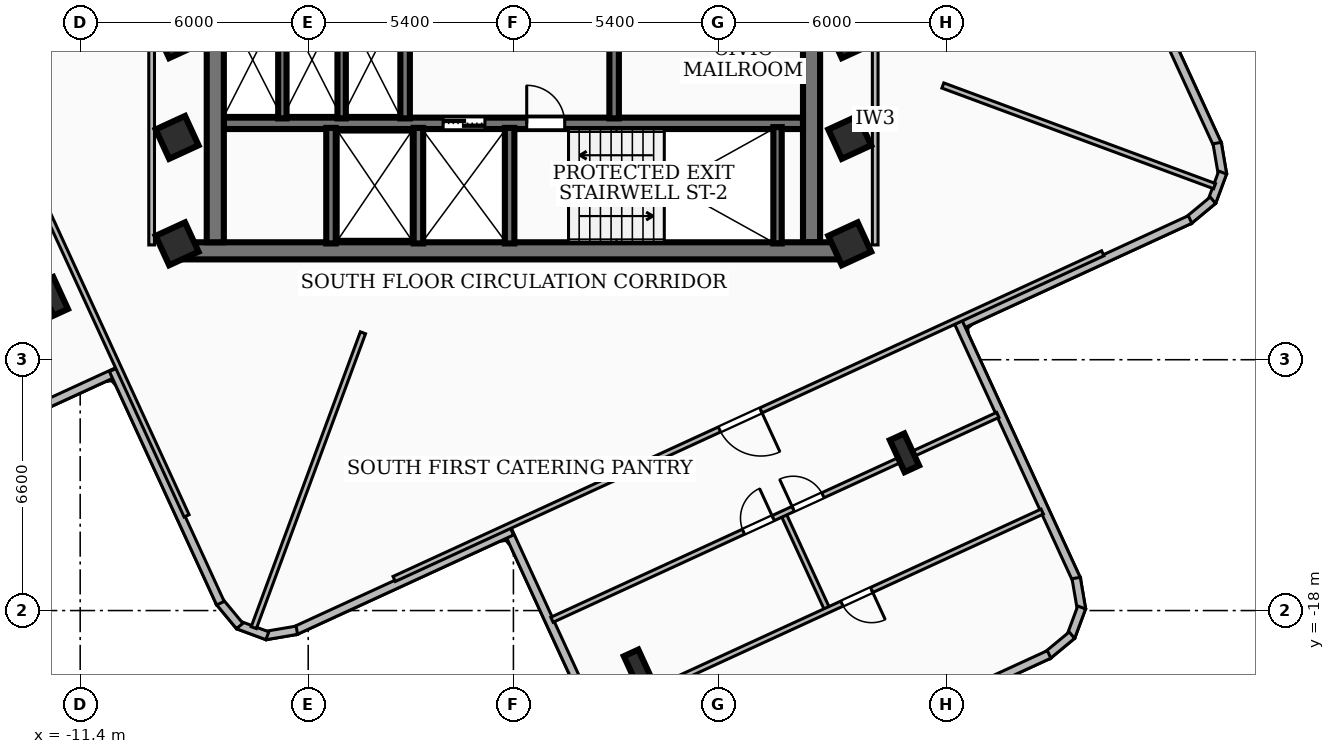
"""IFC4 building model, lengths in metres.
Left out: names, types, materials, properties, quantities, classifications, styles, units other than length and angle.
Written with IfcOpenShell. Run it as: python <this file> out.ifc"""

import sys

from ifc_helpers import new_model, si_unit, direction, frame, frame_2d, origin, origin_2d, place, context, subcontext, project, spatial, rectangle, i_section, extrude, element, fill, save


model = new_model("IFC4")
c1 = context("Model", 3, precision=1e-05, world=origin(), true_north=direction((0.0, 1.0)))
c2 = subcontext(c1, "Body", "Model", "MODEL_VIEW")
j1 = project(units=[si_unit("LENGTHUNIT", "METRE"), si_unit("PLANEANGLEUNIT", "RADIAN")], contexts=[c1])
p1 = place(None, origin())
s1 = spatial("IfcSite", under=j1, at=p1, CompositionType="ELEMENT")
p2 = place(p1, origin())
s2 = spatial("IfcBuilding", under=s1, at=p2, CompositionType="ELEMENT")
p3 = place(p2, frame((0.0, 0.0, 184.68)))
s3 = spatial("IfcBuildingStorey", under=s2, at=p3, CompositionType="ELEMENT", Elevation=184.68)
p4 = place(p3, frame((8.78, -8.535, 0.0), z_axis=(0.0, 0.0, 1.0), x_axis=(-1.0, 0.0, 0.0)))
e1 = element("IfcWall", 1, at=p4, inside=s3, PredefinedType="SHEAR", context=c2, shape_type="SweptSolid", body=[
    extrude(rectangle(XDim=17.56, YDim=0.45, at=frame_2d((8.78, 0.0))), origin(), (0.0, 0.0, 1.0), 3.34),
])
for number, where, z_axis, x_axis in (
    (2, (-7.845, -8.31, 0.0), (0.0, 0.0, 1.0), (0.0, 1.0, 0.0)),
    (3, (7.845, -1.975, 0.0), (0.0, 0.0, 1.0), (0.0, -1.0, 0.0)),
):
    element("IfcWall", number, at=place(p3, frame(where, z_axis=z_axis, x_axis=x_axis)), inside=s3, PredefinedType="SHEAR", context=c2, shape_type="SweptSolid", body=[
        extrude(rectangle(XDim=6.335, YDim=0.45, at=frame_2d((3.167, 0.0))), origin(), (0.0, 0.0, 1.0), 3.34),
    ])
p5 = place(p3, frame((-7.62, -5.18, 0.0), z_axis=(0.0, 0.0, 1.0), x_axis=(1.0, 0.0, 0.0)))
e4 = element("IfcWall", 4, at=p5, inside=s3, PredefinedType="SOLIDWALL", context=c2, shape_type="SweptSolid", body=[
    extrude(rectangle(XDim=15.24, YDim=0.3, at=frame_2d((7.62, 0.0))), origin(), (0.0, 0.0, 1.0), 3.34),
])
p6 = place(p5, frame((5.77, 0.0, 0.0)))
e5 = element("IfcOpeningElement", 5, at=p6, cuts=e4, PredefinedType="OPENING", context=c2, shape_type="SweptSolid", body=[
    extrude(rectangle(XDim=1.1, YDim=2.15, at=frame_2d((0.55, 1.075))), frame((0.0, 0.16, 0.0), z_axis=(0.0, -1.0, 0.0), x_axis=(1.0, 0.0, 0.0)), (0.0, 0.0, 1.0), 0.32),
])
p7 = place(p5, frame((7.97, 0.0, 0.0)))
e6 = element("IfcOpeningElement", 6, at=p7, cuts=e4, PredefinedType="OPENING", context=c2, shape_type="SweptSolid", body=[
    extrude(rectangle(XDim=1.0, YDim=2.1, at=frame_2d((0.5, 1.05))), frame((0.0, 0.16, 0.0), z_axis=(0.0, -1.0, 0.0), x_axis=(1.0, 0.0, 0.0)), (0.0, 0.0, 1.0), 0.32),
])
p8 = place(p3, frame((6.95, -8.34, 0.0), z_axis=(0.0, 0.0, 1.0), x_axis=(0.0, 1.0, 0.0)))
e7 = element("IfcWall", 7, at=p8, inside=s3, PredefinedType="SOLIDWALL", context=c2, shape_type="SweptSolid", body=[
    extrude(rectangle(XDim=3.06, YDim=0.22, at=frame_2d((1.53, 0.0))), origin(), (0.0, 0.0, 1.0), 3.34),
])
for number, where, z_axis, x_axis in (
    (8, (-0.1, -8.34, 0.0), (0.0, 0.0, 1.0), (0.0, 1.0, 0.0)),
    (9, (-2.5, -8.34, 0.0), (0.0, 0.0, 1.0), (0.0, 1.0, 0.0)),
    (10, (-4.8, -8.34, 0.0), (0.0, 0.0, 1.0), (0.0, 1.0, 0.0)),
):
    element("IfcWall", number, at=place(p3, frame(where, z_axis=z_axis, x_axis=x_axis)), inside=s3, PredefinedType="SOLIDWALL", context=c2, shape_type="SweptSolid", body=[
        extrude(rectangle(XDim=3.04, YDim=0.25, at=frame_2d((1.52, 0.0))), origin(), (0.0, 0.0, 1.0), 3.34),
    ])
for number, where, z_axis, x_axis in (
    (11, (-2.85, -5.05, 0.0), (0.0, 0.0, 1.0), (0.0, 1.0, 0.0)),
    (12, (2.65, -5.05, 0.0), (0.0, 0.0, 1.0), (0.0, 1.0, 0.0)),
):
    element("IfcWall", number, at=place(p3, frame(where, z_axis=z_axis, x_axis=x_axis)), inside=s3, PredefinedType="SOLIDWALL", context=c2, shape_type="SweptSolid", body=[
        extrude(rectangle(XDim=3.07, YDim=0.25, at=frame_2d((1.535, 0.0))), origin(), (0.0, 0.0, 1.0), 3.34),
    ])
for number, where, z_axis, x_axis in (
    (13, (-6.08, -5.05, 0.0), (0.0, 0.0, 1.0), (0.0, 1.0, 0.0)),
    (14, (-4.52, -5.05, 0.0), (0.0, 0.0, 1.0), (0.0, 1.0, 0.0)),
):
    element("IfcWall", number, at=place(p3, frame(where, z_axis=z_axis, x_axis=x_axis)), inside=s3, PredefinedType="SOLIDWALL", context=c2, shape_type="SweptSolid", body=[
        extrude(rectangle(XDim=3.07, YDim=0.22, at=frame_2d((1.535, 0.0))), origin(), (0.0, 0.0, 1.0), 3.34),
    ])
for number, where, z_axis, x_axis in (
    (15, (-8.85, -5.55, 0.0), (0.0, 0.0, 1.0), (0.909, 0.418, 0.0)),
    (16, (-8.85, -2.9, 0.0), (0.0, 0.0, 1.0), (0.909, 0.418, 0.0)),
    (17, (8.85, -5.55, 0.0), (0.0, 0.0, 1.0), (0.909, 0.418, 0.0)),
    (18, (8.85, -2.9, 0.0), (0.0, 0.0, 1.0), (0.909, 0.418, 0.0)),
    (19, (8.85, -8.35, 0.0), (0.0, 0.0, 1.0), (0.909, 0.418, 0.0)),
    (20, (-8.85, -8.35, 0.0), (0.0, 0.0, 1.0), (0.909, 0.418, 0.0)),
):
    element("IfcColumn", number, at=place(p3, frame(where, z_axis=z_axis, x_axis=x_axis)), inside=s3, PredefinedType="COLUMN", context=c2, shape_type="SweptSolid", body=[
        extrude(rectangle(XDim=0.85, YDim=0.85, at=origin_2d()), origin(), (0.0, 0.0, 1.0), 3.6),
    ])
for number, where, z_axis, x_axis in (
    (21, (-12.106, -9.731, 0.0), (0.0, 0.0, 1.0), (0.909, 0.418, 0.0)),
    (22, (3.29, -19.536, 0.0), (0.0, 0.0, 1.0), (0.909, 0.418, 0.0)),
    (23, (10.29, -13.85, 0.0), (0.0, 0.0, 1.0), (0.909, 0.418, 0.0)),
):
    element("IfcColumn", number, at=place(p3, frame(where, z_axis=z_axis, x_axis=x_axis)), inside=s3, PredefinedType="COLUMN", context=c2, shape_type="SweptSolid", body=[
        extrude(i_section(OverallWidth=0.418, OverallDepth=0.927, WebThickness=0.019, FlangeThickness=0.032, at=origin_2d()), origin(), (0.0, 0.0, 1.0), 3.6),
    ])
p9 = place(p3, frame((-10.415, -11.708, 0.0), z_axis=(0.0, 0.0, 1.0), x_axis=(-0.908668829641, -0.417517614047, 0.0)))
e24 = element("IfcWall", 24, at=p9, inside=s3, PredefinedType="SOLIDWALL", context=c2, shape_type="SweptSolid", body=[
    extrude(rectangle(XDim=9.058, YDim=0.22, at=frame_2d((4.529, 0.0))), origin(), (0.0, 0.0, 1.0), 3.34),
])
p10 = place(p9, frame((5.258, 0.0, 0.85)))
e25 = element("IfcOpeningElement", 25, at=p10, cuts=e24, PredefinedType="OPENING", context=c2, shape_type="SweptSolid", body=[
    extrude(rectangle(XDim=2.7, YDim=1.65, at=frame_2d((1.35, 0.825))), frame((0.0, 0.12, 0.0), z_axis=(0.0, -1.0, 0.0), x_axis=(1.0, 0.0, 0.0)), (0.0, 0.0, 1.0), 0.24),
])
p11 = place(p3, frame((15.911, -0.042, 0.0), z_axis=(0.0, 0.0, 1.0), x_axis=(0.417479344719, -0.908686412759, 0.0)))
e26 = element("IfcWall", 26, at=p11, inside=s3, PredefinedType="SOLIDWALL", context=c2, shape_type="SweptSolid", body=[
    extrude(rectangle(XDim=6.278, YDim=0.22, at=frame_2d((3.139, 0.0))), origin(), (0.0, 0.0, 1.0), 3.34),
])
p12 = place(p3, frame((18.518, -5.699, 0.0), z_axis=(0.0, 0.0, 1.0), x_axis=(0.167382556682, -0.985892022342, 0.0)))
e27 = element("IfcWall", 27, at=p12, inside=s3, PredefinedType="SOLIDWALL", context=c2, shape_type="SweptSolid", body=[
    extrude(rectangle(XDim=0.836, YDim=0.22, at=frame_2d((0.418, 0.0))), origin(), (0.0, 0.0, 1.0), 3.34),
])
p13 = place(p3, frame((18.663, -6.475, 0.0), z_axis=(0.0, 0.0, 1.0), x_axis=(-0.348538641681, -0.937294412261, 0.0)))
e28 = element("IfcWall", 28, at=p13, inside=s3, PredefinedType="SOLIDWALL", context=c2, shape_type="SweptSolid", body=[
    extrude(rectangle(XDim=0.818, YDim=0.22, at=frame_2d((0.409, 0.0))), origin(), (0.0, 0.0, 1.0), 3.34),
])
p14 = place(p3, frame((18.406, -7.203, 0.0), z_axis=(0.0, 0.0, 1.0), x_axis=(-0.769323077261, -0.638859924235, 0.0)))
e29 = element("IfcWall", 29, at=p14, inside=s3, PredefinedType="SOLIDWALL", context=c2, shape_type="SweptSolid", body=[
    extrude(rectangle(XDim=0.835, YDim=0.22, at=frame_2d((0.417, 0.0))), origin(), (0.0, 0.0, 1.0), 3.34),
])
p15 = place(p3, frame((17.806, -7.71, 0.0), z_axis=(0.0, 0.0, 1.0), x_axis=(-0.908646468859, -0.417566275734, 0.0)))
e30 = element("IfcWall", 30, at=p15, inside=s3, PredefinedType="SOLIDWALL", context=c2, shape_type="SweptSolid", body=[
    extrude(rectangle(XDim=6.758, YDim=0.22, at=frame_2d((3.379, 0.0))), origin(), (0.0, 0.0, 1.0), 3.34),
])
p16 = place(p3, frame((11.708, -10.415, 0.0), z_axis=(0.0, 0.0, 1.0), x_axis=(0.417535966584, -0.908660396743, 0.0)))
e31 = element("IfcWall", 31, at=p16, inside=s3, PredefinedType="SOLIDWALL", context=c2, shape_type="SweptSolid", body=[
    extrude(rectangle(XDim=7.458, YDim=0.22, at=frame_2d((3.729, 0.0))), origin(), (0.0, 0.0, 1.0), 3.34),
])
p17 = place(p3, frame((14.808, -17.144, 0.0), z_axis=(0.0, 0.0, 1.0), x_axis=(0.167575597201, -0.985859228908, 0.0)))
e32 = element("IfcWall", 32, at=p17, inside=s3, PredefinedType="SOLIDWALL", context=c2, shape_type="SweptSolid", body=[
    extrude(rectangle(XDim=0.835, YDim=0.22, at=frame_2d((0.417, 0.0))), origin(), (0.0, 0.0, 1.0), 3.34),
])
p18 = place(p3, frame((14.953, -17.919, 0.0), z_axis=(0.0, 0.0, 1.0), x_axis=(-0.347789921671, -0.937572488069, 0.0)))
e33 = element("IfcWall", 33, at=p18, inside=s3, PredefinedType="SOLIDWALL", context=c2, shape_type="SweptSolid", body=[
    extrude(rectangle(XDim=0.819, YDim=0.22, at=frame_2d((0.41, 0.0))), origin(), (0.0, 0.0, 1.0), 3.34),
])
p19 = place(p3, frame((14.696, -18.648, 0.0), z_axis=(0.0, 0.0, 1.0), x_axis=(-0.770042109777, -0.637993063576, 0.0)))
e34 = element("IfcWall", 34, at=p19, inside=s3, PredefinedType="SOLIDWALL", context=c2, shape_type="SweptSolid", body=[
    extrude(rectangle(XDim=0.834, YDim=0.22, at=frame_2d((0.417, 0.0))), origin(), (0.0, 0.0, 1.0), 3.34),
])
p20 = place(p3, frame((14.096, -19.154, 0.0), z_axis=(0.0, 0.0, 1.0), x_axis=(-0.90868873868, -0.417474282076, 0.0)))
e35 = element("IfcWall", 35, at=p20, inside=s3, PredefinedType="SOLIDWALL", context=c2, shape_type="SweptSolid", body=[
    extrude(rectangle(XDim=10.101, YDim=0.22, at=frame_2d((5.051, 0.0))), origin(), (0.0, 0.0, 1.0), 3.34),
])
p21 = place(p20, frame((6.829, 0.0, 0.85)))
e36 = element("IfcOpeningElement", 36, at=p21, cuts=e35, PredefinedType="OPENING", context=c2, shape_type="SweptSolid", body=[
    extrude(rectangle(XDim=2.1, YDim=1.6, at=frame_2d((1.05, 0.8))), frame((0.0, 0.12, 0.0), z_axis=(0.0, -1.0, 0.0), x_axis=(1.0, 0.0, 0.0)), (0.0, 0.0, 1.0), 0.24),
])
p22 = place(p3, frame((2.955, -22.645, 0.0), z_axis=(0.0, 0.0, 1.0), x_axis=(-0.417523547277, 0.9086661034, 0.0)))
e37 = element("IfcWall", 37, at=p22, inside=s3, PredefinedType="SOLIDWALL", context=c2, shape_type="SweptSolid", body=[
    extrude(rectangle(XDim=7.458, YDim=0.22, at=frame_2d((3.729, 0.0))), origin(), (0.0, 0.0, 1.0), 3.34),
])
p23 = place(p3, frame((-0.042, -15.911, 0.0), z_axis=(0.0, 0.0, 1.0), x_axis=(-0.908686412759, -0.417479344719, 0.0)))
e38 = element("IfcWall", 38, at=p23, inside=s3, PredefinedType="SOLIDWALL", context=c2, shape_type="SweptSolid", body=[
    extrude(rectangle(XDim=6.278, YDim=0.22, at=frame_2d((3.139, 0.0))), origin(), (0.0, 0.0, 1.0), 3.34),
])
p24 = place(p3, frame((-5.699, -18.518, 0.0), z_axis=(0.0, 0.0, 1.0), x_axis=(-0.985892022342, -0.167382556682, 0.0)))
e39 = element("IfcWall", 39, at=p24, inside=s3, PredefinedType="SOLIDWALL", context=c2, shape_type="SweptSolid", body=[
    extrude(rectangle(XDim=0.836, YDim=0.22, at=frame_2d((0.418, 0.0))), origin(), (0.0, 0.0, 1.0), 3.34),
])
p25 = place(p3, frame((-6.475, -18.663, 0.0), z_axis=(0.0, 0.0, 1.0), x_axis=(-0.937294412261, 0.348538641681, 0.0)))
e40 = element("IfcWall", 40, at=p25, inside=s3, PredefinedType="SOLIDWALL", context=c2, shape_type="SweptSolid", body=[
    extrude(rectangle(XDim=0.818, YDim=0.22, at=frame_2d((0.409, 0.0))), origin(), (0.0, 0.0, 1.0), 3.34),
])
p26 = place(p3, frame((-7.203, -18.406, 0.0), z_axis=(0.0, 0.0, 1.0), x_axis=(-0.638859924235, 0.769323077261, 0.0)))
e41 = element("IfcWall", 41, at=p26, inside=s3, PredefinedType="SOLIDWALL", context=c2, shape_type="SweptSolid", body=[
    extrude(rectangle(XDim=0.835, YDim=0.22, at=frame_2d((0.417, 0.0))), origin(), (0.0, 0.0, 1.0), 3.34),
])
p27 = place(p3, frame((-7.71, -17.806, 0.0), z_axis=(0.0, 0.0, 1.0), x_axis=(-0.417566275734, 0.908646468859, 0.0)))
e42 = element("IfcWall", 42, at=p27, inside=s3, PredefinedType="SOLIDWALL", context=c2, shape_type="SweptSolid", body=[
    extrude(rectangle(XDim=6.758, YDim=0.22, at=frame_2d((3.379, 0.0))), origin(), (0.0, 0.0, 1.0), 3.34),
])
p28 = place(p3, frame((-9.52, -8.38, 0.0), z_axis=(0.0, 0.0, 1.0), x_axis=(0.0, 1.0, 0.0)))
e43 = element("IfcWall", 43, at=p28, inside=s3, PredefinedType="PARTITIONING", context=c2, shape_type="SweptSolid", body=[
    extrude(rectangle(XDim=6.63, YDim=0.15, at=frame_2d((3.315, 0.0))), origin(), (0.0, 0.0, 1.0), 2.644),
])
p29 = place(p3, frame((9.52, -8.38, 0.0), z_axis=(0.0, 0.0, 1.0), x_axis=(0.0, 1.0, 0.0)))
e44 = element("IfcWall", 44, at=p29, inside=s3, PredefinedType="PARTITIONING", context=c2, shape_type="SweptSolid", body=[
    extrude(rectangle(XDim=6.63, YDim=0.15, at=frame_2d((3.315, 0.0))), origin(), (0.0, 0.0, 1.0), 3.34),
])
p30 = place(p3, frame((-3.959, -10.691, 0.0), z_axis=(0.0, 0.0, 1.0), x_axis=(-0.347243238044, -0.937775097576, 0.0)))
e45 = element("IfcWall", 45, at=p30, inside=s3, PredefinedType="PARTITIONING", context=c2, shape_type="SweptSolid", body=[
    extrude(rectangle(XDim=8.274, YDim=0.145, at=frame_2d((4.137, 0.0))), origin(), (0.0, 0.0, 1.0), 3.34),
])
p31 = place(p3, frame((11.3, -4.185, 0.0), z_axis=(0.0, 0.0, 1.0), x_axis=(0.937797421925, -0.347182942311, 0.0)))
e46 = element("IfcWall", 46, at=p31, inside=s3, PredefinedType="PARTITIONING", context=c2, shape_type="SweptSolid", body=[
    extrude(rectangle(XDim=7.624, YDim=0.145, at=frame_2d((3.812, 0.0))), origin(), (0.0, 0.0, 1.0), 3.34),
])
p32 = place(p3, frame((-8.6, -15.508, 0.0), z_axis=(0.0, 0.0, 1.0), x_axis=(-0.41757132443, 0.908644148726, 0.0)))
e47 = element("IfcWall", 47, at=p32, inside=s3, PredefinedType="PARTITIONING", context=c2, shape_type="SweptSolid", body=[
    extrude(rectangle(XDim=20.521, YDim=0.145, at=frame_2d((10.26, 0.0))), origin(), (0.0, 0.0, 1.0), 2.644),
])
p33 = place(p32, frame((9.9, 0.0, 0.0)))
e48 = element("IfcOpeningElement", 48, at=p33, cuts=e47, PredefinedType="OPENING", context=c2, shape_type="SweptSolid", body=[
    extrude(rectangle(XDim=1.2, YDim=2.1, at=frame_2d((0.6, 1.05))), frame((0.0, 0.083, 0.0), z_axis=(0.0, -1.0, 0.0), x_axis=(1.0, 0.0, 0.0)), (0.0, 0.0, 1.0), 0.165),
])
p34 = place(p3, frame((15.508, -8.6, 0.0), z_axis=(0.0, 0.0, 1.0), x_axis=(-0.908644148726, -0.41757132443, 0.0)))
e49 = element("IfcWall", 49, at=p34, inside=s3, PredefinedType="PARTITIONING", context=c2, shape_type="SweptSolid", body=[
    extrude(rectangle(XDim=20.521, YDim=0.145, at=frame_2d((10.26, 0.0))), origin(), (0.0, 0.0, 1.0), 2.644),
])
p35 = place(p34, frame((9.9, 0.0, 0.0)))
e50 = element("IfcOpeningElement", 50, at=p35, cuts=e49, PredefinedType="OPENING", context=c2, shape_type="SweptSolid", body=[
    extrude(rectangle(XDim=1.2, YDim=2.1, at=frame_2d((0.6, 1.05))), frame((0.0, 0.083, 0.0), z_axis=(0.0, -1.0, 0.0), x_axis=(1.0, 0.0, 0.0)), (0.0, 0.0, 1.0), 0.165),
])
p36 = place(p3, frame((7.123, -15.502, 0.0), z_axis=(0.0, 0.0, 1.0), x_axis=(0.417526601233, -0.90866470013, 0.0)))
e51 = element("IfcWall", 51, at=p36, inside=s3, PredefinedType="PARTITIONING", context=c2, shape_type="SweptSolid", body=[
    extrude(rectangle(XDim=2.68, YDim=0.145, at=frame_2d((1.34, 0.0))), origin(), (0.0, 0.0, 1.0), 3.34),
])
p37 = place(p3, frame((1.015, -18.242, 0.0), z_axis=(0.0, 0.0, 1.0), x_axis=(0.908680334094, 0.417492575301, 0.0)))
e52 = element("IfcWall", 52, at=p37, inside=s3, PredefinedType="PARTITIONING", context=c2, shape_type="SweptSolid", body=[
    extrude(rectangle(XDim=12.91, YDim=0.145, at=frame_2d((6.455, 0.0))), origin(), (0.0, 0.0, 1.0), 2.644),
])
p38 = place(p37, frame((5.545, 0.0, 0.0)))
e53 = element("IfcOpeningElement", 53, at=p38, cuts=e52, PredefinedType="OPENING", context=c2, shape_type="SweptSolid", body=[
    extrude(rectangle(XDim=0.86, YDim=2.04, at=frame_2d((0.43, 1.02))), frame((0.0, 0.083, 0.0), z_axis=(0.0, -1.0, 0.0), x_axis=(1.0, 0.0, 0.0)), (0.0, 0.0, 1.0), 0.165),
])
p39 = place(p37, frame((6.986, 0.0, 0.0)))
e54 = element("IfcOpeningElement", 54, at=p39, cuts=e52, PredefinedType="OPENING", context=c2, shape_type="SweptSolid", body=[
    extrude(rectangle(XDim=0.86, YDim=2.04, at=frame_2d((0.43, 1.02))), frame((0.0, 0.083, 0.0), z_axis=(0.0, -1.0, 0.0), x_axis=(1.0, 0.0, 0.0)), (0.0, 0.0, 1.0), 0.165),
])
p40 = place(p3, frame((13.915, -15.396, 0.0), z_axis=(0.0, 0.0, 1.0), x_axis=(-0.908677037864, -0.41749974953, 0.0)))
e55 = element("IfcWall", 55, at=p40, inside=s3, PredefinedType="PARTITIONING", context=c2, shape_type="SweptSolid", body=[
    extrude(rectangle(XDim=12.91, YDim=0.145, at=frame_2d((6.455, 0.0))), origin(), (0.0, 0.0, 1.0), 3.34),
])
p41 = place(p40, frame((4.94, 0.0, 0.0)))
e56 = element("IfcOpeningElement", 56, at=p41, cuts=e55, PredefinedType="OPENING", context=c2, shape_type="SweptSolid", body=[
    extrude(rectangle(XDim=0.86, YDim=2.04, at=frame_2d((0.43, 1.02))), frame((0.0, 0.083, 0.0), z_axis=(0.0, -1.0, 0.0), x_axis=(1.0, 0.0, 0.0)), (0.0, 0.0, 1.0), 0.165),
])
p42 = place(p6, origin())
e57 = element("IfcDoor", 57, at=p42, inside=s3, OperationType="DOUBLE_DOOR_SLIDING", PredefinedType="DOOR", context=c2, shape_type="SweptSolid", body=[
    extrude(rectangle(XDim=1.1, YDim=2.15, at=frame_2d((0.55, 1.075))), frame((0.0, 0.025, 0.0), z_axis=(0.0, -1.0, 0.0), x_axis=(1.0, 0.0, 0.0)), (0.0, 0.0, 1.0), 0.05),
])
fill(e5, e57)
p43 = place(p7, origin())
e58 = element("IfcDoor", 58, at=p43, inside=s3, OperationType="SINGLE_SWING_LEFT", PredefinedType="DOOR", context=c2, shape_type="SweptSolid", body=[
    extrude(rectangle(XDim=1.0, YDim=2.1, at=frame_2d((0.5, 1.05))), frame((0.0, 0.025, 0.0), z_axis=(0.0, -1.0, 0.0), x_axis=(1.0, 0.0, 0.0)), (0.0, 0.0, 1.0), 0.05),
])
fill(e6, e58)
p44 = place(p35, origin())
e59 = element("IfcDoor", 59, at=p44, inside=s3, OperationType="SINGLE_SWING_LEFT", PredefinedType="DOOR", context=c2, shape_type="SweptSolid", body=[
    extrude(rectangle(XDim=1.2, YDim=2.1, at=frame_2d((0.6, 1.05))), frame((0.0, 0.025, 0.0), z_axis=(0.0, -1.0, 0.0), x_axis=(1.0, 0.0, 0.0)), (0.0, 0.0, 1.0), 0.05),
])
fill(e50, e59)
p45 = place(p38, origin())
e60 = element("IfcDoor", 60, at=p45, inside=s3, OperationType="SINGLE_SWING_RIGHT", PredefinedType="DOOR", context=c2, shape_type="SweptSolid", body=[
    extrude(rectangle(XDim=0.86, YDim=2.04, at=frame_2d((0.43, 1.02))), frame((0.0, 0.025, 0.0), z_axis=(0.0, -1.0, 0.0), x_axis=(1.0, 0.0, 0.0)), (0.0, 0.0, 1.0), 0.05),
])
fill(e53, e60)
p46 = place(p39, origin())
e61 = element("IfcDoor", 61, at=p46, inside=s3, OperationType="SINGLE_SWING_LEFT", PredefinedType="DOOR", context=c2, shape_type="SweptSolid", body=[
    extrude(rectangle(XDim=0.86, YDim=2.04, at=frame_2d((0.43, 1.02))), frame((0.0, 0.025, 0.0), z_axis=(0.0, -1.0, 0.0), x_axis=(1.0, 0.0, 0.0)), (0.0, 0.0, 1.0), 0.05),
])
fill(e54, e61)
p47 = place(p41, origin())
e62 = element("IfcDoor", 62, at=p47, inside=s3, OperationType="SINGLE_SWING_LEFT", PredefinedType="DOOR", context=c2, shape_type="SweptSolid", body=[
    extrude(rectangle(XDim=0.86, YDim=2.04, at=frame_2d((0.43, 1.02))), frame((0.0, 0.025, 0.0), z_axis=(0.0, -1.0, 0.0), x_axis=(1.0, 0.0, 0.0)), (0.0, 0.0, 1.0), 0.05),
])
fill(e56, e62)
save(model, sys.argv[1])
